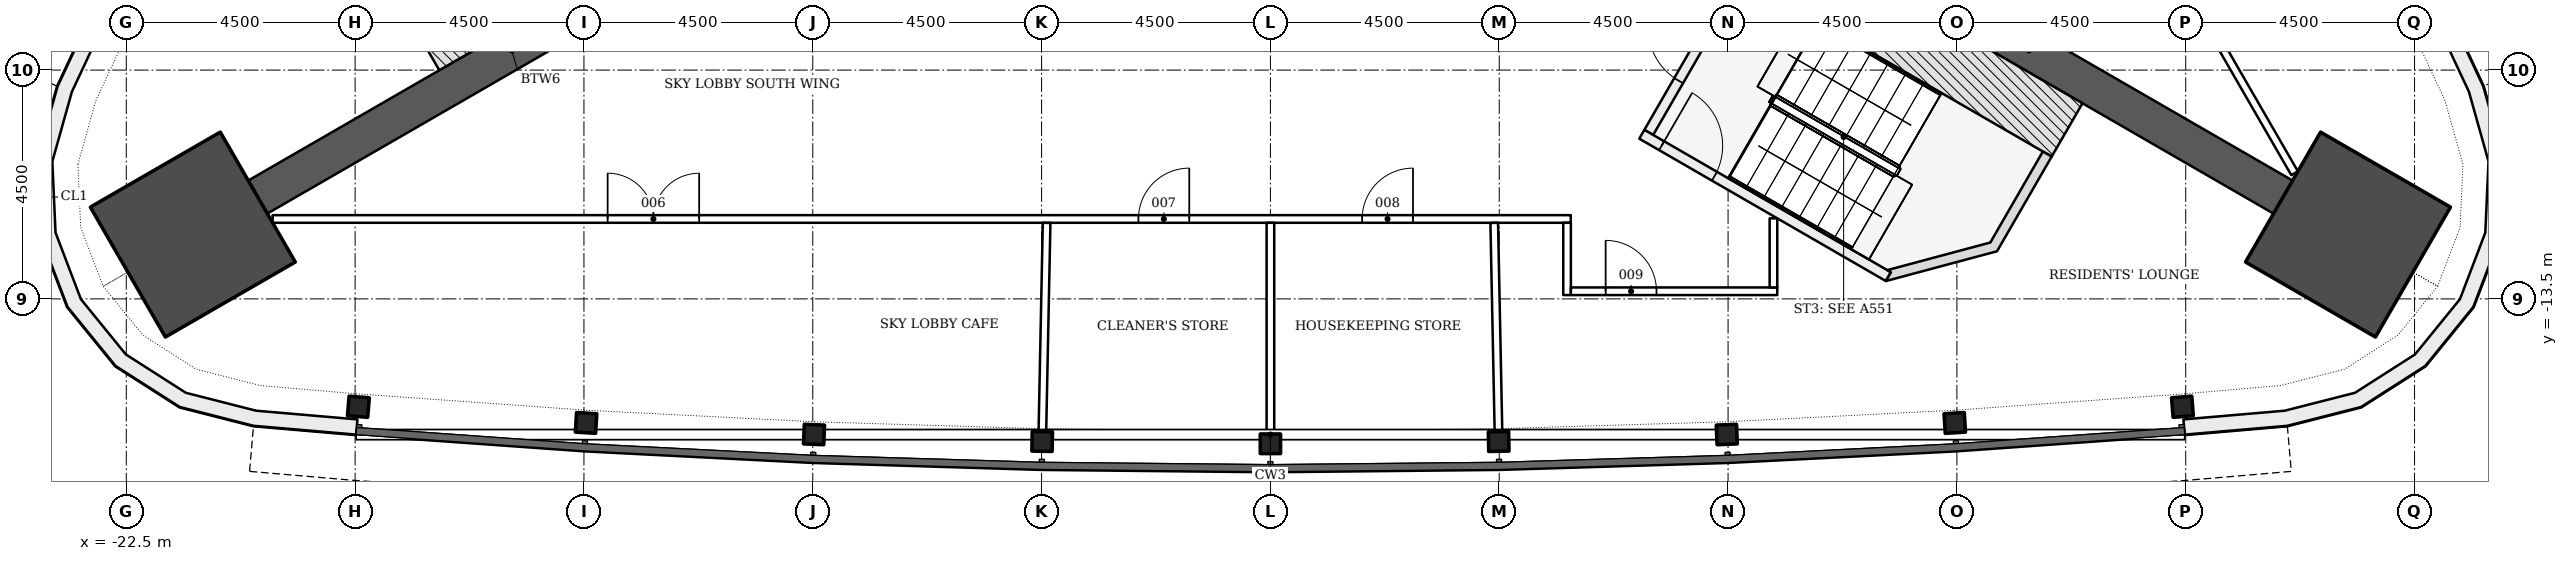
"""IFC4 building model, lengths in metres.
Left out: names, types, materials, properties, quantities, classifications, styles, units other than length and angle.
Written with IfcOpenShell. Run it as: python <this file> out.ifc"""

import sys

from ifc_helpers import new_model, si_unit, direction, frame, frame_2d, origin, origin_2d, place, context, subcontext, project, spatial, polyline, rectangle, i_section, outline, extrude, element, fill, save


model = new_model("IFC4")
c1 = context("Model", 3, precision=1e-05, world=origin(), true_north=direction((0.0, 1.0)))
c2 = subcontext(c1, "Body", "Model", "MODEL_VIEW")
j1 = project(units=[si_unit("LENGTHUNIT", "METRE"), si_unit("PLANEANGLEUNIT", "RADIAN")], contexts=[c1])
p1 = place(None, origin())
s1 = spatial("IfcSite", under=j1, at=p1, CompositionType="ELEMENT")
p2 = place(p1, origin())
s2 = spatial("IfcBuilding", under=s1, at=p2, CompositionType="ELEMENT")
p3 = place(p2, frame((0.0, 0.0, 134.7)))
s3 = spatial("IfcBuildingStorey", under=s2, at=p3, CompositionType="ELEMENT", Elevation=134.7)
for number, where, z_axis, x_axis in (
    (1, (-9.922, -5.728, -0.3), (0.0, 0.0, 1.0), (-0.866, -0.5, 0.0)),
    (2, (9.922, -5.728, -0.3), (0.0, 0.0, 1.0), (0.866, -0.5, 0.0)),
):
    element("IfcWall", number, at=place(p3, frame(where, z_axis=z_axis, x_axis=x_axis)), inside=s3, PredefinedType="SHEAR", context=c2, shape_type="SweptSolid", body=[
        extrude(rectangle(XDim=11.539, YDim=0.75, at=frame_2d((5.769, 0.0))), origin(), (0.0, 0.0, 1.0), 5.5),
    ])
for number, where, z_axis, x_axis in (
    (3, (-21.192, -12.235, -0.3), (0.0, 0.0, 1.0), (-0.866, -0.5, 0.0)),
    (4, (21.192, -12.235, -0.3), (0.0, 0.0, 1.0), (0.866, -0.5, 0.0)),
):
    element("IfcColumn", number, at=place(p3, frame(where, z_axis=z_axis, x_axis=x_axis)), inside=s3, PredefinedType="COLUMN", context=c2, shape_type="SweptSolid", body=[
        extrude(rectangle(XDim=2.95, YDim=2.95, at=origin_2d()), origin(), (0.0, 0.0, 1.0), 5.5),
    ])
for number, where, z_axis, x_axis in (
    (5, (-17.936, -15.621, -0.3), (0.0, 0.0, 1.0), (0.997, -0.081, 0.0)),
    (6, (-13.458, -15.939, -0.3), (0.0, 0.0, 1.0), (0.998, -0.061, 0.0)),
    (7, (-8.975, -16.167, -0.3), (0.0, 0.0, 1.0), (0.999, -0.041, 0.0)),
    (8, (-4.489, -16.304, -0.3), (0.0, 0.0, 1.0), (1.0, -0.02, 0.0)),
    (9, (0.0, -16.349, -0.3), (0.0, 0.0, 1.0), (1.0, 0.0, 0.0)),
    (10, (4.489, -16.304, -0.3), (0.0, 0.0, 1.0), (1.0, 0.02, 0.0)),
    (11, (8.975, -16.167, -0.3), (0.0, 0.0, 1.0), (0.999, 0.041, 0.0)),
    (12, (13.458, -15.939, -0.3), (0.0, 0.0, 1.0), (0.998, 0.061, 0.0)),
    (13, (17.936, -15.621, -0.3), (0.0, 0.0, 1.0), (0.997, 0.081, 0.0)),
):
    element("IfcColumn", number, at=place(p3, frame(where, z_axis=z_axis, x_axis=x_axis)), inside=s3, PredefinedType="COLUMN", context=c2, shape_type="SweptSolid", body=[
        extrude(i_section(OverallWidth=0.399, OverallDepth=0.386, WebThickness=0.021, FlangeThickness=0.033, FilletRadius=0.015, at=origin_2d()), origin(), (0.0, 0.0, 1.0), 5.5),
    ])
p4 = place(p3, origin())
e14 = element("IfcWall", 14, at=p4, inside=s3, PredefinedType="NOTDEFINED", context=c2, shape_type="SweptSolid", body=[
    extrude(outline(polyline([(-22.993, -7.487), (-23.852, -9.322), (-24.257, -10.763), (-24.189, -12.259), (-23.656, -13.658), (-22.711, -14.819), (-21.449, -15.625), (-19.999, -15.995), (-17.98, -16.169), (-17.955, -15.87), (-19.948, -15.699), (-21.328, -15.347), (-22.509, -14.592), (-23.393, -13.506), (-23.891, -12.197), (-23.955, -10.798), (-23.57, -9.426), (-22.721, -7.614), (-22.993, -7.487)])), origin(), (0.0, 0.0, 1.0), 5.2),
])
p5 = place(p3, origin())
e15 = element("IfcWall", 15, at=p5, inside=s3, PredefinedType="NOTDEFINED", context=c2, shape_type="SweptSolid", body=[
    extrude(outline(polyline([(17.98, -16.169), (19.999, -15.995), (21.449, -15.625), (22.711, -14.819), (23.656, -13.658), (24.189, -12.259), (24.257, -10.763), (23.852, -9.322), (22.993, -7.487), (22.721, -7.614), (23.57, -9.426), (23.955, -10.798), (23.891, -12.197), (23.393, -13.506), (22.509, -14.592), (21.328, -15.347), (19.948, -15.699), (17.955, -15.87), (17.98, -16.169)])), origin(), (0.0, 0.0, 1.0), 5.2),
])
p6 = place(p3, frame((-10.412, -4.879, -0.3), z_axis=(0.0, 0.0, 1.0), x_axis=(-0.866026919366, -0.499997374926, 0.0)))
e16 = element("IfcWall", 16, at=p6, inside=s3, PredefinedType="SHEAR", context=c2, shape_type="SweptSolid", body=[
    extrude(rectangle(XDim=7.2, YDim=1.211, at=frame_2d((3.6, 0.0))), origin(), (0.0, 0.0, 1.0), 5.5),
])
p7 = place(p3, frame((7.44, -10.226, -0.3), z_axis=(0.0, 0.0, 1.0), x_axis=(0.500022077904, 0.866012656725, 0.0)))
e17 = element("IfcWall", 17, at=p7, inside=s3, PredefinedType="SHEAR", context=c2, shape_type="SweptSolid", body=[
    extrude(rectangle(XDim=3.55, YDim=0.2, at=frame_2d((1.775, 0.0))), origin(), (0.0, 0.0, 1.0), 5.5),
])
p8 = place(p7, frame((1.175, 0.0, 0.3)))
e18 = element("IfcOpeningElement", 18, at=p8, cuts=e17, PredefinedType="OPENING", context=c2, shape_type="SweptSolid", body=[
    extrude(rectangle(XDim=1.2, YDim=2.1, at=frame_2d((0.6, 1.05))), frame((0.0, 0.11, 0.0), z_axis=(0.0, -1.0, 0.0), x_axis=(1.0, 0.0, 0.0)), (0.0, 0.0, 1.0), 0.22),
])
p9 = place(p3, frame((7.304, -10.262, -0.3), z_axis=(0.0, 0.0, 1.0), x_axis=(0.866026594901, -0.49999793692, 0.0)))
e19 = element("IfcWall", 19, at=p9, inside=s3, PredefinedType="SHEAR", context=c2, shape_type="SweptSolid", body=[
    extrude(rectangle(XDim=5.6, YDim=0.2, at=frame_2d((2.8, 0.0))), origin(), (0.0, 0.0, 1.0), 5.5),
])
p10 = place(p9, frame((0.45, 0.0, 0.3)))
e20 = element("IfcOpeningElement", 20, at=p10, cuts=e19, PredefinedType="OPENING", context=c2, shape_type="SweptSolid", body=[
    extrude(rectangle(XDim=1.2, YDim=2.1, at=frame_2d((0.6, 1.05))), frame((0.0, 0.11, 0.0), z_axis=(0.0, -1.0, 0.0), x_axis=(1.0, 0.0, 0.0)), (0.0, 0.0, 1.0), 0.22),
])
p11 = place(p3, frame((9.431, -6.577, -0.3), z_axis=(0.0, 0.0, 1.0), x_axis=(0.866018442252, -0.500012057535, 0.0)))
e21 = element("IfcWall", 21, at=p11, inside=s3, PredefinedType="SHEAR", context=c2, shape_type="SweptSolid", body=[
    extrude(rectangle(XDim=7.2, YDim=1.211, at=frame_2d((3.6, 0.0))), origin(), (0.0, 0.0, 1.0), 5.5),
])
p12 = place(p3, frame((0.0, 0.0, -0.3)))
e22 = element("IfcWall", 22, at=p12, inside=s3, PredefinedType="SHEAR", context=c2, shape_type="SweptSolid", body=[
    extrude(outline(polyline([(12.104, -13.149), (14.289, -12.563), (15.364, -10.701), (15.191, -10.601), (14.157, -12.392), (12.132, -12.934), (12.204, -12.976), (12.204, -12.976), (12.204, -12.976), (12.204, -12.976), (12.204, -12.976), (12.204, -12.976), (12.204, -12.976), (12.204, -12.976), (12.204, -12.976), (12.204, -12.976), (12.204, -12.976), (12.204, -12.976), (12.204, -12.976), (12.204, -12.976), (12.204, -12.976), (12.204, -12.976), (12.204, -12.976), (12.104, -13.149)])), origin(), (0.0, 0.0, 1.0), 5.5),
])
p13 = place(p3, frame((-19.622, -11.928, 0.0), z_axis=(0.0, 0.0, 1.0), x_axis=(1.0, 0.0, 0.0)))
e23 = element("IfcWall", 23, at=p13, inside=s3, PredefinedType="PARTITIONING", context=c2, shape_type="SweptSolid", body=[
    extrude(rectangle(XDim=25.529, YDim=0.15, at=frame_2d((12.764, 0.0))), origin(), (0.0, 0.0, 1.0), 4.647),
])
p14 = place(p13, frame((6.588, 0.0, 0.0)))
e24 = element("IfcOpeningElement", 24, at=p14, cuts=e23, PredefinedType="OPENING", context=c2, shape_type="SweptSolid", body=[
    extrude(rectangle(XDim=1.8, YDim=2.1, at=frame_2d((0.9, 1.05))), frame((0.0, 0.085, 0.0), z_axis=(0.0, -1.0, 0.0), x_axis=(1.0, 0.0, 0.0)), (0.0, 0.0, 1.0), 0.17),
])
p15 = place(p13, frame((17.026, 0.0, 0.0)))
e25 = element("IfcOpeningElement", 25, at=p15, cuts=e23, PredefinedType="OPENING", context=c2, shape_type="SweptSolid", body=[
    extrude(rectangle(XDim=1.0, YDim=2.1, at=frame_2d((0.5, 1.05))), frame((0.0, 0.085, 0.0), z_axis=(0.0, -1.0, 0.0), x_axis=(1.0, 0.0, 0.0)), (0.0, 0.0, 1.0), 0.17),
])
p16 = place(p13, frame((21.426, 0.0, 0.0)))
e26 = element("IfcOpeningElement", 26, at=p16, cuts=e23, PredefinedType="OPENING", context=c2, shape_type="SweptSolid", body=[
    extrude(rectangle(XDim=1.0, YDim=2.1, at=frame_2d((0.5, 1.05))), frame((0.0, 0.085, 0.0), z_axis=(0.0, -1.0, 0.0), x_axis=(1.0, 0.0, 0.0)), (0.0, 0.0, 1.0), 0.17),
])
p17 = place(p3, frame((-4.485, -16.129, 0.0), z_axis=(0.0, 0.0, 1.0), x_axis=(0.020301285243, 0.999793907672, 0.0)))
e27 = element("IfcWall", 27, at=p17, inside=s3, PredefinedType="PARTITIONING", context=c2, shape_type="SweptSolid", body=[
    extrude(rectangle(XDim=4.125, YDim=0.15, at=frame_2d((2.062, 0.0))), origin(), (0.0, 0.0, 1.0), 4.647),
])
p18 = place(p3, frame((0.0, -16.174, 0.0), z_axis=(0.0, 0.0, 1.0), x_axis=(0.0, 1.0, 0.0)))
e28 = element("IfcWall", 28, at=p18, inside=s3, PredefinedType="PARTITIONING", context=c2, shape_type="SweptSolid", body=[
    extrude(rectangle(XDim=4.171, YDim=0.15, at=frame_2d((2.085, 0.0))), origin(), (0.0, 0.0, 1.0), 4.647),
])
p19 = place(p3, frame((4.401, -12.005, 0.0), z_axis=(0.0, 0.0, 1.0), x_axis=(0.020301285243, -0.999793907672, 0.0)))
e29 = element("IfcWall", 29, at=p19, inside=s3, PredefinedType="PARTITIONING", context=c2, shape_type="SweptSolid", body=[
    extrude(rectangle(XDim=4.125, YDim=0.15, at=frame_2d((2.062, 0.0))), origin(), (0.0, 0.0, 1.0), 4.647),
])
p20 = place(p3, frame((5.833, -12.003, 0.0), z_axis=(0.0, 0.0, 1.0), x_axis=(0.0, -1.0, 0.0)))
e30 = element("IfcWall", 30, at=p20, inside=s3, PredefinedType="PARTITIONING", context=c2, shape_type="SweptSolid", body=[
    extrude(rectangle(XDim=1.422, YDim=0.15, at=frame_2d((0.711, 0.0))), origin(), (0.0, 0.0, 1.0), 5.2),
])
p21 = place(p3, frame((5.909, -13.35, 0.0), z_axis=(0.0, 0.0, 1.0), x_axis=(1.0, 0.0, 0.0)))
e31 = element("IfcWall", 31, at=p21, inside=s3, PredefinedType="PARTITIONING", context=c2, shape_type="SweptSolid", body=[
    extrude(rectangle(XDim=4.059, YDim=0.15, at=frame_2d((2.029, 0.0))), origin(), (0.0, 0.0, 1.0), 4.723),
])
p22 = place(p21, frame((0.684, 0.0, 0.0)))
e32 = element("IfcOpeningElement", 32, at=p22, cuts=e31, PredefinedType="OPENING", context=c2, shape_type="SweptSolid", body=[
    extrude(rectangle(XDim=1.0, YDim=2.1, at=frame_2d((0.5, 1.05))), frame((0.0, 0.085, 0.0), z_axis=(0.0, -1.0, 0.0), x_axis=(1.0, 0.0, 0.0)), (0.0, 0.0, 1.0), 0.17),
])
p23 = place(p3, frame((9.893, -13.275, 0.0), z_axis=(0.0, 0.0, 1.0), x_axis=(0.0, 1.0, 0.0)))
e33 = element("IfcWall", 33, at=p23, inside=s3, PredefinedType="PARTITIONING", context=c2, shape_type="SweptSolid", body=[
    extrude(rectangle(XDim=1.359, YDim=0.15, at=frame_2d((0.68, 0.0))), origin(), (0.0, 0.0, 1.0), 5.2),
])
p24 = place(p3, frame((7.377, 11.079, 0.0), z_axis=(0.0, 0.0, 1.0), x_axis=(0.500006395474, -0.866021711325, 0.0)))
e34 = element("IfcWall", 34, at=p24, inside=s3, PredefinedType="PARTITIONING", context=c2, shape_type="SweptSolid", body=[
    extrude(rectangle(XDim=25.529, YDim=0.15, at=frame_2d((12.765, 0.0))), origin(), (0.0, 0.0, 1.0), 4.647),
])
p25 = place(p24, frame((17.541, 0.0, 0.0)))
e35 = element("IfcOpeningElement", 35, at=p25, cuts=e34, PredefinedType="OPENING", context=c2, shape_type="SweptSolid", body=[
    extrude(rectangle(XDim=1.0, YDim=2.1, at=frame_2d((0.5, 1.05))), frame((0.0, 0.085, 0.0), z_axis=(0.0, -1.0, 0.0), x_axis=(1.0, 0.0, 0.0)), (0.0, 0.0, 1.0), 0.17),
])
p26 = place(p24, frame((7.71, 0.0, 0.0)))
e36 = element("IfcOpeningElement", 36, at=p26, cuts=e34, PredefinedType="OPENING", context=c2, shape_type="SweptSolid", body=[
    extrude(rectangle(XDim=1.0, YDim=2.1, at=frame_2d((0.5, 1.05))), frame((0.0, 0.085, 0.0), z_axis=(0.0, -1.0, 0.0), x_axis=(1.0, 0.0, 0.0)), (0.0, 0.0, 1.0), 0.17),
])
p27 = place(p24, frame((3.311, 0.0, 0.0)))
e37 = element("IfcOpeningElement", 37, at=p27, cuts=e34, PredefinedType="OPENING", context=c2, shape_type="SweptSolid", body=[
    extrude(rectangle(XDim=1.0, YDim=2.1, at=frame_2d((0.5, 1.05))), frame((0.0, 0.085, 0.0), z_axis=(0.0, -1.0, 0.0), x_axis=(1.0, 0.0, 0.0)), (0.0, 0.0, 1.0), 0.17),
])
p28 = place(p8, origin())
e38 = element("IfcDoor", 38, at=p28, inside=s3, OperationType="SINGLE_SWING_RIGHT", PredefinedType="DOOR", context=c2, shape_type="SweptSolid", body=[
    extrude(rectangle(XDim=1.2, YDim=2.1, at=frame_2d((0.6, 1.05))), frame((0.0, 0.025, 0.0), z_axis=(0.0, -1.0, 0.0), x_axis=(1.0, 0.0, 0.0)), (0.0, 0.0, 1.0), 0.05),
])
fill(e18, e38)
p29 = place(p10, origin())
e39 = element("IfcDoor", 39, at=p29, inside=s3, OperationType="SINGLE_SWING_LEFT", PredefinedType="DOOR", context=c2, shape_type="SweptSolid", body=[
    extrude(rectangle(XDim=1.2, YDim=2.1, at=frame_2d((0.6, 1.05))), frame((0.0, 0.025, 0.0), z_axis=(0.0, -1.0, 0.0), x_axis=(1.0, 0.0, 0.0)), (0.0, 0.0, 1.0), 0.05),
])
fill(e20, e39)
p30 = place(p14, origin())
e40 = element("IfcDoor", 40, at=p30, inside=s3, OperationType="DOUBLE_DOOR_SINGLE_SWING", PredefinedType="DOOR", context=c2, shape_type="SweptSolid", body=[
    extrude(rectangle(XDim=1.8, YDim=2.1, at=frame_2d((0.9, 1.05))), frame((0.0, 0.025, 0.0), z_axis=(0.0, -1.0, 0.0), x_axis=(1.0, 0.0, 0.0)), (0.0, 0.0, 1.0), 0.05),
])
fill(e24, e40)
p31 = place(p15, origin())
e41 = element("IfcDoor", 41, at=p31, inside=s3, OperationType="SINGLE_SWING_RIGHT", PredefinedType="DOOR", context=c2, shape_type="SweptSolid", body=[
    extrude(rectangle(XDim=1.0, YDim=2.1, at=frame_2d((0.5, 1.05))), frame((0.0, 0.025, 0.0), z_axis=(0.0, -1.0, 0.0), x_axis=(1.0, 0.0, 0.0)), (0.0, 0.0, 1.0), 0.05),
])
fill(e25, e41)
p32 = place(p16, origin())
e42 = element("IfcDoor", 42, at=p32, inside=s3, OperationType="SINGLE_SWING_RIGHT", PredefinedType="DOOR", context=c2, shape_type="SweptSolid", body=[
    extrude(rectangle(XDim=1.0, YDim=2.1, at=frame_2d((0.5, 1.05))), frame((0.0, 0.025, 0.0), z_axis=(0.0, -1.0, 0.0), x_axis=(1.0, 0.0, 0.0)), (0.0, 0.0, 1.0), 0.05),
])
fill(e26, e42)
p33 = place(p22, origin())
e43 = element("IfcDoor", 43, at=p33, inside=s3, OperationType="SINGLE_SWING_LEFT", PredefinedType="DOOR", context=c2, shape_type="SweptSolid", body=[
    extrude(rectangle(XDim=1.0, YDim=2.1, at=frame_2d((0.5, 1.05))), frame((0.0, 0.025, 0.0), z_axis=(0.0, -1.0, 0.0), x_axis=(1.0, 0.0, 0.0)), (0.0, 0.0, 1.0), 0.05),
])
fill(e32, e43)
save(model, sys.argv[1])
